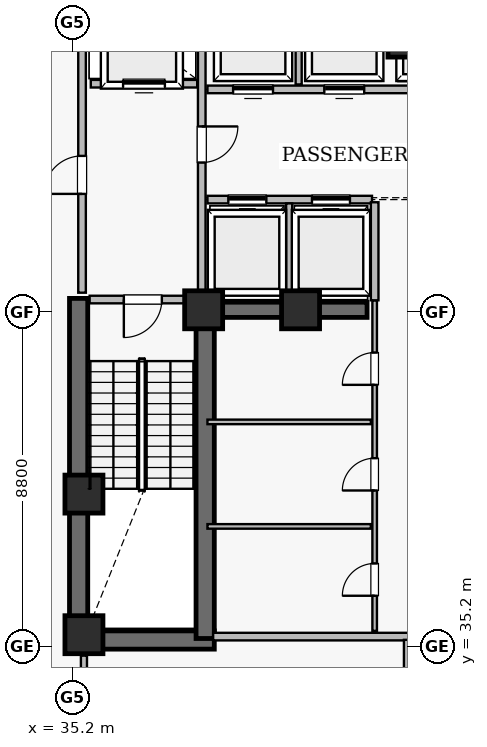
"""IFC4 building model, lengths in metres.
Left out: names, types, materials, properties, quantities, classifications, styles, units other than length and angle.
Written with IfcOpenShell. Run it as: python <this file> out.ifc"""

import sys

from ifc_helpers import new_model, si_unit, direction, frame, frame_2d, origin, origin_2d, place, context, subcontext, project, spatial, rectangle, extrude, element, fill, save


model = new_model("IFC4")
c1 = context("Model", 3, precision=1e-05, world=origin(), true_north=direction((0.0, 1.0)))
c2 = subcontext(c1, "Body", "Model", "MODEL_VIEW")
j1 = project(units=[si_unit("LENGTHUNIT", "METRE"), si_unit("PLANEANGLEUNIT", "RADIAN")], contexts=[c1])
p1 = place(None, origin())
s1 = spatial("IfcSite", under=j1, at=p1, CompositionType="ELEMENT")
p2 = place(p1, origin())
s2 = spatial("IfcBuilding", under=s1, at=p2, CompositionType="ELEMENT")
p3 = place(p2, frame((0.0, 0.0, 189.8)))
s3 = spatial("IfcBuildingStorey", under=s2, at=p3, CompositionType="ELEMENT", Elevation=189.8)
p4 = place(p3, frame((35.12, 35.36, 0.0), z_axis=(0.0, 0.0, 1.0), x_axis=(1.0, 0.0, 0.0)))
e1 = element("IfcWall", 1, at=p4, inside=s3, PredefinedType="SHEAR", context=c2, shape_type="SweptSolid", body=[
    extrude(rectangle(XDim=3.81, YDim=0.48, at=frame_2d((1.905, 0.0))), origin(), (0.0, 0.0, 1.0), 4.345),
])
p5 = place(p3, frame((35.36, 35.12, 0.0), z_axis=(0.0, 0.0, 1.0), x_axis=(0.0, 1.0, 0.0)))
e2 = element("IfcWall", 2, at=p5, inside=s3, PredefinedType="SHEAR", context=c2, shape_type="SweptSolid", body=[
    extrude(rectangle(XDim=9.23, YDim=0.48, at=frame_2d((4.615, 0.0))), origin(), (0.0, 0.0, 1.0), 4.345),
])
p6 = place(p3, frame((38.69, 35.4, 0.0), z_axis=(0.0, 0.0, 1.0), x_axis=(0.0, 1.0, 0.0)))
e3 = element("IfcWall", 3, at=p6, inside=s3, PredefinedType="SHEAR", context=c2, shape_type="SweptSolid", body=[
    extrude(rectangle(XDim=8.95, YDim=0.48, at=frame_2d((4.475, 0.0))), origin(), (0.0, 0.0, 1.0), 4.345),
])
p7 = place(p3, frame((44.0, 50.1, 0.0), z_axis=(0.0, 0.0, 1.0), x_axis=(0.0, 1.0, 0.0)))
e4 = element("IfcWall", 4, at=p7, inside=s3, PredefinedType="SHEAR", context=c2, shape_type="SweptSolid", body=[
    extrude(rectangle(XDim=2.1, YDim=0.4, at=frame_2d((1.05, 0.0))), origin(), (0.0, 0.0, 1.0), 4.345),
])
p8 = place(p3, frame((38.75, 44.05, 0.0), z_axis=(0.0, 0.0, 1.0), x_axis=(1.0, 0.0, 0.0)))
e5 = element("IfcWall", 5, at=p8, inside=s3, PredefinedType="SHEAR", context=c2, shape_type="SweptSolid", body=[
    extrude(rectangle(XDim=4.2, YDim=0.4, at=frame_2d((2.1, 0.0))), origin(), (0.0, 0.0, 1.0), 4.345),
])
for number, where, z_axis, x_axis in (
    (6, (35.5, 35.5, 0.0), (0.0, 0.0, 1.0), (1.0, 0.0, 0.0)),
    (7, (38.65, 44.05, 0.0), (0.0, 0.0, 1.0), (1.0, 0.0, 0.0)),
    (8, (44.0, 51.2, 0.0), (0.0, 0.0, 1.0), (1.0, 0.0, 0.0)),
    (9, (35.5, 39.2, 0.0), (0.0, 0.0, 1.0), (1.0, 0.0, 0.0)),
    (10, (41.2, 44.05, 0.0), (0.0, 0.0, 1.0), (1.0, 0.0, 0.0)),
):
    element("IfcColumn", number, at=place(p3, frame(where, z_axis=z_axis, x_axis=x_axis)), inside=s3, PredefinedType="COLUMN", context=c2, shape_type="SweptSolid", body=[
        extrude(rectangle(XDim=1.0, YDim=1.0, at=origin_2d()), origin(), (0.0, 0.0, 1.0), 4.6),
    ])
p9 = place(p3, frame((43.15, 35.6, 0.0), z_axis=(0.0, 0.0, 1.0), x_axis=(0.0, 1.0, 0.0)))
e11 = element("IfcWall", 11, at=p9, inside=s3, PredefinedType="PARTITIONING", context=c2, shape_type="SweptSolid", body=[
    extrude(rectangle(XDim=8.7, YDim=0.12, at=frame_2d((4.35, 0.0))), origin(), (0.0, 0.0, 1.0), 4.345),
])
p10 = place(p9, frame((0.925, 0.0, 0.0)))
e12 = element("IfcOpeningElement", 12, at=p10, cuts=e11, PredefinedType="OPENING", context=c2, shape_type="SweptSolid", body=[
    extrude(rectangle(XDim=0.85, YDim=2.1, at=frame_2d((0.425, 1.05))), frame((0.0, 0.07, 0.0), z_axis=(0.0, -1.0, 0.0), x_axis=(1.0, 0.0, 0.0)), (0.0, 0.0, 1.0), 0.14),
])
p11 = place(p9, frame((3.695, 0.0, 0.0)))
e13 = element("IfcOpeningElement", 13, at=p11, cuts=e11, PredefinedType="OPENING", context=c2, shape_type="SweptSolid", body=[
    extrude(rectangle(XDim=0.85, YDim=2.1, at=frame_2d((0.425, 1.05))), frame((0.0, 0.07, 0.0), z_axis=(0.0, -1.0, 0.0), x_axis=(1.0, 0.0, 0.0)), (0.0, 0.0, 1.0), 0.14),
])
p12 = place(p9, frame((6.475, 0.0, 0.0)))
e14 = element("IfcOpeningElement", 14, at=p12, cuts=e11, PredefinedType="OPENING", context=c2, shape_type="SweptSolid", body=[
    extrude(rectangle(XDim=0.85, YDim=2.1, at=frame_2d((0.425, 1.05))), frame((0.0, 0.07, 0.0), z_axis=(0.0, -1.0, 0.0), x_axis=(1.0, 0.0, 0.0)), (0.0, 0.0, 1.0), 0.14),
])
p13 = place(p3, frame((35.45, 44.5, 0.0), z_axis=(0.0, 0.0, 1.0), x_axis=(0.0, 1.0, 0.0)))
e15 = element("IfcWall", 15, at=p13, inside=s3, PredefinedType="SOLIDWALL", context=c2, shape_type="SweptSolid", body=[
    extrude(rectangle(XDim=7.92, YDim=0.2, at=frame_2d((3.96, 0.0))), origin(), (0.0, 0.0, 1.0), 4.345),
])
p14 = place(p13, frame((2.6, 0.0, 0.0)))
e16 = element("IfcOpeningElement", 16, at=p14, cuts=e15, PredefinedType="OPENING", context=c2, shape_type="SweptSolid", body=[
    extrude(rectangle(XDim=1.0, YDim=2.15, at=frame_2d((0.5, 1.075))), frame((0.0, 0.11, 0.0), z_axis=(0.0, -1.0, 0.0), x_axis=(1.0, 0.0, 0.0)), (0.0, 0.0, 1.0), 0.22),
])
p15 = place(p3, frame((38.6, 44.5, 0.0), z_axis=(0.0, 0.0, 1.0), x_axis=(0.0, 1.0, 0.0)))
e17 = element("IfcWall", 17, at=p15, inside=s3, PredefinedType="SOLIDWALL", context=c2, shape_type="SweptSolid", body=[
    extrude(rectangle(XDim=7.92, YDim=0.2, at=frame_2d((3.96, 0.0))), origin(), (0.0, 0.0, 1.0), 4.345),
])
p16 = place(p15, frame((3.425, 0.0, 0.0)))
e18 = element("IfcOpeningElement", 18, at=p16, cuts=e17, PredefinedType="OPENING", context=c2, shape_type="SweptSolid", body=[
    extrude(rectangle(XDim=0.95, YDim=2.15, at=frame_2d((0.475, 1.075))), frame((0.0, 0.11, 0.0), z_axis=(0.0, -1.0, 0.0), x_axis=(1.0, 0.0, 0.0)), (0.0, 0.0, 1.0), 0.22),
])
p17 = place(p3, frame((38.75, 49.85, 0.0), z_axis=(0.0, 0.0, 1.0), x_axis=(1.0, 0.0, 0.0)))
e19 = element("IfcWall", 19, at=p17, inside=s3, PredefinedType="SOLIDWALL", context=c2, shape_type="SweptSolid", body=[
    extrude(rectangle(XDim=5.5, YDim=0.2, at=frame_2d((2.75, 0.0))), origin(), (0.0, 0.0, 1.0), 4.345),
])
p18 = place(p17, frame((0.675, 0.0, 0.0)))
e20 = element("IfcOpeningElement", 20, at=p18, cuts=e19, PredefinedType="OPENING", context=c2, shape_type="SweptSolid", body=[
    extrude(rectangle(XDim=1.05, YDim=2.15, at=frame_2d((0.525, 1.075))), frame((0.0, 0.11, 0.0), z_axis=(0.0, -1.0, 0.0), x_axis=(1.0, 0.0, 0.0)), (0.0, 0.0, 1.0), 0.22),
])
p19 = place(p17, frame((3.075, 0.0, 0.0)))
e21 = element("IfcOpeningElement", 21, at=p19, cuts=e19, PredefinedType="OPENING", context=c2, shape_type="SweptSolid", body=[
    extrude(rectangle(XDim=1.05, YDim=2.15, at=frame_2d((0.525, 1.075))), frame((0.0, 0.11, 0.0), z_axis=(0.0, -1.0, 0.0), x_axis=(1.0, 0.0, 0.0)), (0.0, 0.0, 1.0), 0.22),
])
p20 = place(p3, frame((38.75, 46.95, 0.0), z_axis=(0.0, 0.0, 1.0), x_axis=(1.0, 0.0, 0.0)))
e22 = element("IfcWall", 22, at=p20, inside=s3, PredefinedType="SOLIDWALL", context=c2, shape_type="SweptSolid", body=[
    extrude(rectangle(XDim=4.33, YDim=0.2, at=frame_2d((2.165, 0.0))), origin(), (0.0, 0.0, 1.0), 4.345),
])
p21 = place(p20, frame((0.55, 0.0, 0.0)))
e23 = element("IfcOpeningElement", 23, at=p21, cuts=e22, PredefinedType="OPENING", context=c2, shape_type="SweptSolid", body=[
    extrude(rectangle(XDim=1.0, YDim=2.15, at=frame_2d((0.5, 1.075))), frame((0.0, 0.11, 0.0), z_axis=(0.0, -1.0, 0.0), x_axis=(1.0, 0.0, 0.0)), (0.0, 0.0, 1.0), 0.22),
])
p22 = place(p20, frame((2.75, 0.0, 0.0)))
e24 = element("IfcOpeningElement", 24, at=p22, cuts=e22, PredefinedType="OPENING", context=c2, shape_type="SweptSolid", body=[
    extrude(rectangle(XDim=1.0, YDim=2.15, at=frame_2d((0.5, 1.075))), frame((0.0, 0.11, 0.0), z_axis=(0.0, -1.0, 0.0), x_axis=(1.0, 0.0, 0.0)), (0.0, 0.0, 1.0), 0.22),
])
p23 = place(p3, frame((35.65, 44.32, 0.0), z_axis=(0.0, 0.0, 1.0), x_axis=(1.0, 0.0, 0.0)))
e25 = element("IfcWall", 25, at=p23, inside=s3, PredefinedType="SOLIDWALL", context=c2, shape_type="SweptSolid", body=[
    extrude(rectangle(XDim=2.8, YDim=0.2, at=frame_2d((1.4, 0.0))), origin(), (0.0, 0.0, 1.0), 4.345),
])
p24 = place(p23, frame((0.9, 0.0, 0.0)))
e26 = element("IfcOpeningElement", 26, at=p24, cuts=e25, PredefinedType="OPENING", context=c2, shape_type="SweptSolid", body=[
    extrude(rectangle(XDim=1.0, YDim=2.15, at=frame_2d((0.5, 1.075))), frame((0.0, 0.11, 0.0), z_axis=(0.0, -1.0, 0.0), x_axis=(1.0, 0.0, 0.0)), (0.0, 0.0, 1.0), 0.22),
])
p25 = place(p3, frame((35.68, 50.0, 0.0), z_axis=(0.0, 0.0, 1.0), x_axis=(1.0, 0.0, 0.0)))
e27 = element("IfcWall", 27, at=p25, inside=s3, PredefinedType="SOLIDWALL", context=c2, shape_type="SweptSolid", body=[
    extrude(rectangle(XDim=2.8, YDim=0.2, at=frame_2d((1.4, 0.0))), origin(), (0.0, 0.0, 1.0), 4.345),
])
p26 = place(p25, frame((0.85, 0.0, 0.0)))
e28 = element("IfcOpeningElement", 28, at=p26, cuts=e27, PredefinedType="OPENING", context=c2, shape_type="SweptSolid", body=[
    extrude(rectangle(XDim=1.1, YDim=2.15, at=frame_2d((0.55, 1.075))), frame((0.0, 0.11, 0.0), z_axis=(0.0, -1.0, 0.0), x_axis=(1.0, 0.0, 0.0)), (0.0, 0.0, 1.0), 0.22),
])
p27 = place(p3, frame((38.9, 35.45, 0.0), z_axis=(0.0, 0.0, 1.0), x_axis=(1.0, 0.0, 0.0)))
e29 = element("IfcWall", 29, at=p27, inside=s3, PredefinedType="SOLIDWALL", context=c2, shape_type="SweptSolid", body=[
    extrude(rectangle(XDim=10.2, YDim=0.2, at=frame_2d((5.1, 0.0))), origin(), (0.0, 0.0, 1.0), 4.345),
])
p28 = place(p3, frame((44.0, 26.156, 0.0), z_axis=(0.0, 0.0, 1.0), x_axis=(0.0, 1.0, 0.0)))
e30 = element("IfcWall", 30, at=p28, inside=s3, PredefinedType="SOLIDWALL", context=c2, shape_type="SweptSolid", body=[
    extrude(rectangle(XDim=9.209, YDim=0.16, at=frame_2d((4.604, 0.0))), origin(), (0.0, 0.0, 1.0), 3.533),
])
for number, where, z_axis, x_axis in (
    (31, (38.75, 38.35, 0.0), (0.0, 0.0, 1.0), (1.0, 0.0, 0.0)),
    (32, (38.75, 41.1, 0.0), (0.0, 0.0, 1.0), (1.0, 0.0, 0.0)),
):
    element("IfcWall", number, at=place(p3, frame(where, z_axis=z_axis, x_axis=x_axis)), inside=s3, PredefinedType="PARTITIONING", context=c2, shape_type="SweptSolid", body=[
        extrude(rectangle(XDim=4.3, YDim=0.12, at=frame_2d((2.15, 0.0))), origin(), (0.0, 0.0, 1.0), 4.345),
    ])
p29 = place(p3, frame((43.15, 44.3, 0.0), z_axis=(0.0, 0.0, 1.0), x_axis=(0.0, 1.0, 0.0)))
e33 = element("IfcWall", 33, at=p29, inside=s3, PredefinedType="SOLIDWALL", context=c2, shape_type="SweptSolid", body=[
    extrude(rectangle(XDim=2.58, YDim=0.2, at=frame_2d((1.29, 0.0))), origin(), (0.0, 0.0, 1.0), 4.345),
])
p30 = place(p3, frame((40.9, 44.3, 0.0), z_axis=(0.0, 0.0, 1.0), x_axis=(0.0, 1.0, 0.0)))
e34 = element("IfcWall", 34, at=p30, inside=s3, PredefinedType="SOLIDWALL", context=c2, shape_type="SweptSolid", body=[
    extrude(rectangle(XDim=2.55, YDim=0.16, at=frame_2d((1.275, 0.0))), origin(), (0.0, 0.0, 1.0), 4.345),
])
p31 = place(p3, frame((41.15, 49.98, 0.0), z_axis=(0.0, 0.0, 1.0), x_axis=(0.0, 1.0, 0.0)))
e35 = element("IfcWall", 35, at=p31, inside=s3, PredefinedType="SOLIDWALL", context=c2, shape_type="SweptSolid", body=[
    extrude(rectangle(XDim=2.37, YDim=0.16, at=frame_2d((1.185, 0.0))), origin(), (0.0, 0.0, 1.0), 4.345),
])
p32 = place(p3, frame((35.5, 33.4, 0.0), z_axis=(0.0, 0.0, 1.0), x_axis=(0.0, 1.0, 0.0)))
e36 = element("IfcWall", 36, at=p32, inside=s3, PredefinedType="SOLIDWALL", context=c2, shape_type="SweptSolid", body=[
    extrude(rectangle(XDim=1.55, YDim=0.16, at=frame_2d((0.775, 0.0))), origin(), (0.0, 0.0, 1.0), 3.533),
])
p33 = place(p24, frame((1.0, 0.0, 0.0), z_axis=(0.0, 0.0, 1.0), x_axis=(-1.0, 0.0, 0.0)))
e37 = element("IfcDoor", 37, at=p33, inside=s3, OperationType="SINGLE_SWING_LEFT", PredefinedType="DOOR", context=c2, shape_type="SweptSolid", body=[
    extrude(rectangle(XDim=1.0, YDim=2.15, at=frame_2d((0.5, 1.075))), frame((0.0, 0.025, 0.0), z_axis=(0.0, -1.0, 0.0), x_axis=(1.0, 0.0, 0.0)), (0.0, 0.0, 1.0), 0.05),
])
fill(e26, e37)
p34 = place(p14, origin())
e38 = element("IfcDoor", 38, at=p34, inside=s3, OperationType="SINGLE_SWING_LEFT", PredefinedType="DOOR", context=c2, shape_type="SweptSolid", body=[
    extrude(rectangle(XDim=1.0, YDim=2.15, at=frame_2d((0.5, 1.075))), frame((0.0, 0.025, 0.0), z_axis=(0.0, -1.0, 0.0), x_axis=(1.0, 0.0, 0.0)), (0.0, 0.0, 1.0), 0.05),
])
fill(e16, e38)
p35 = place(p16, frame((0.95, 0.0, 0.0), z_axis=(0.0, 0.0, 1.0), x_axis=(-1.0, 0.0, 0.0)))
e39 = element("IfcDoor", 39, at=p35, inside=s3, OperationType="SINGLE_SWING_RIGHT", PredefinedType="DOOR", context=c2, shape_type="SweptSolid", body=[
    extrude(rectangle(XDim=0.95, YDim=2.15, at=frame_2d((0.475, 1.075))), frame((0.0, 0.025, 0.0), z_axis=(0.0, -1.0, 0.0), x_axis=(1.0, 0.0, 0.0)), (0.0, 0.0, 1.0), 0.05),
])
fill(e18, e39)
p36 = place(p26, origin())
e40 = element("IfcDoor", 40, at=p36, inside=s3, OperationType="SLIDING_TO_LEFT", PredefinedType="DOOR", context=c2, shape_type="SweptSolid", body=[
    extrude(rectangle(XDim=1.1, YDim=2.15, at=frame_2d((0.55, 1.075))), frame((0.0, 0.025, 0.0), z_axis=(0.0, -1.0, 0.0), x_axis=(1.0, 0.0, 0.0)), (0.0, 0.0, 1.0), 0.05),
])
fill(e28, e40)
p37 = place(p18, origin())
e41 = element("IfcDoor", 41, at=p37, inside=s3, OperationType="SLIDING_TO_LEFT", PredefinedType="DOOR", context=c2, shape_type="SweptSolid", body=[
    extrude(rectangle(XDim=1.05, YDim=2.15, at=frame_2d((0.525, 1.075))), frame((0.0, 0.025, 0.0), z_axis=(0.0, -1.0, 0.0), x_axis=(1.0, 0.0, 0.0)), (0.0, 0.0, 1.0), 0.05),
])
fill(e20, e41)
p38 = place(p19, origin())
e42 = element("IfcDoor", 42, at=p38, inside=s3, OperationType="SLIDING_TO_LEFT", PredefinedType="DOOR", context=c2, shape_type="SweptSolid", body=[
    extrude(rectangle(XDim=1.05, YDim=2.15, at=frame_2d((0.525, 1.075))), frame((0.0, 0.025, 0.0), z_axis=(0.0, -1.0, 0.0), x_axis=(1.0, 0.0, 0.0)), (0.0, 0.0, 1.0), 0.05),
])
fill(e21, e42)
p39 = place(p21, origin())
e43 = element("IfcDoor", 43, at=p39, inside=s3, OperationType="SLIDING_TO_LEFT", PredefinedType="DOOR", context=c2, shape_type="SweptSolid", body=[
    extrude(rectangle(XDim=1.0, YDim=2.15, at=frame_2d((0.5, 1.075))), frame((0.0, 0.025, 0.0), z_axis=(0.0, -1.0, 0.0), x_axis=(1.0, 0.0, 0.0)), (0.0, 0.0, 1.0), 0.05),
])
fill(e23, e43)
p40 = place(p22, origin())
e44 = element("IfcDoor", 44, at=p40, inside=s3, OperationType="SLIDING_TO_LEFT", PredefinedType="DOOR", context=c2, shape_type="SweptSolid", body=[
    extrude(rectangle(XDim=1.0, YDim=2.15, at=frame_2d((0.5, 1.075))), frame((0.0, 0.025, 0.0), z_axis=(0.0, -1.0, 0.0), x_axis=(1.0, 0.0, 0.0)), (0.0, 0.0, 1.0), 0.05),
])
fill(e24, e44)
p41 = place(p10, origin())
e45 = element("IfcDoor", 45, at=p41, inside=s3, OperationType="SINGLE_SWING_LEFT", PredefinedType="DOOR", context=c2, shape_type="SweptSolid", body=[
    extrude(rectangle(XDim=0.85, YDim=2.1, at=frame_2d((0.425, 1.05))), frame((0.0, 0.025, 0.0), z_axis=(0.0, -1.0, 0.0), x_axis=(1.0, 0.0, 0.0)), (0.0, 0.0, 1.0), 0.05),
])
fill(e12, e45)
p42 = place(p11, origin())
e46 = element("IfcDoor", 46, at=p42, inside=s3, OperationType="SINGLE_SWING_LEFT", PredefinedType="DOOR", context=c2, shape_type="SweptSolid", body=[
    extrude(rectangle(XDim=0.85, YDim=2.1, at=frame_2d((0.425, 1.05))), frame((0.0, 0.025, 0.0), z_axis=(0.0, -1.0, 0.0), x_axis=(1.0, 0.0, 0.0)), (0.0, 0.0, 1.0), 0.05),
])
fill(e13, e46)
p43 = place(p12, origin())
e47 = element("IfcDoor", 47, at=p43, inside=s3, OperationType="SINGLE_SWING_LEFT", PredefinedType="DOOR", context=c2, shape_type="SweptSolid", body=[
    extrude(rectangle(XDim=0.85, YDim=2.1, at=frame_2d((0.425, 1.05))), frame((0.0, 0.025, 0.0), z_axis=(0.0, -1.0, 0.0), x_axis=(1.0, 0.0, 0.0)), (0.0, 0.0, 1.0), 0.05),
])
fill(e14, e47)
save(model, sys.argv[1])
